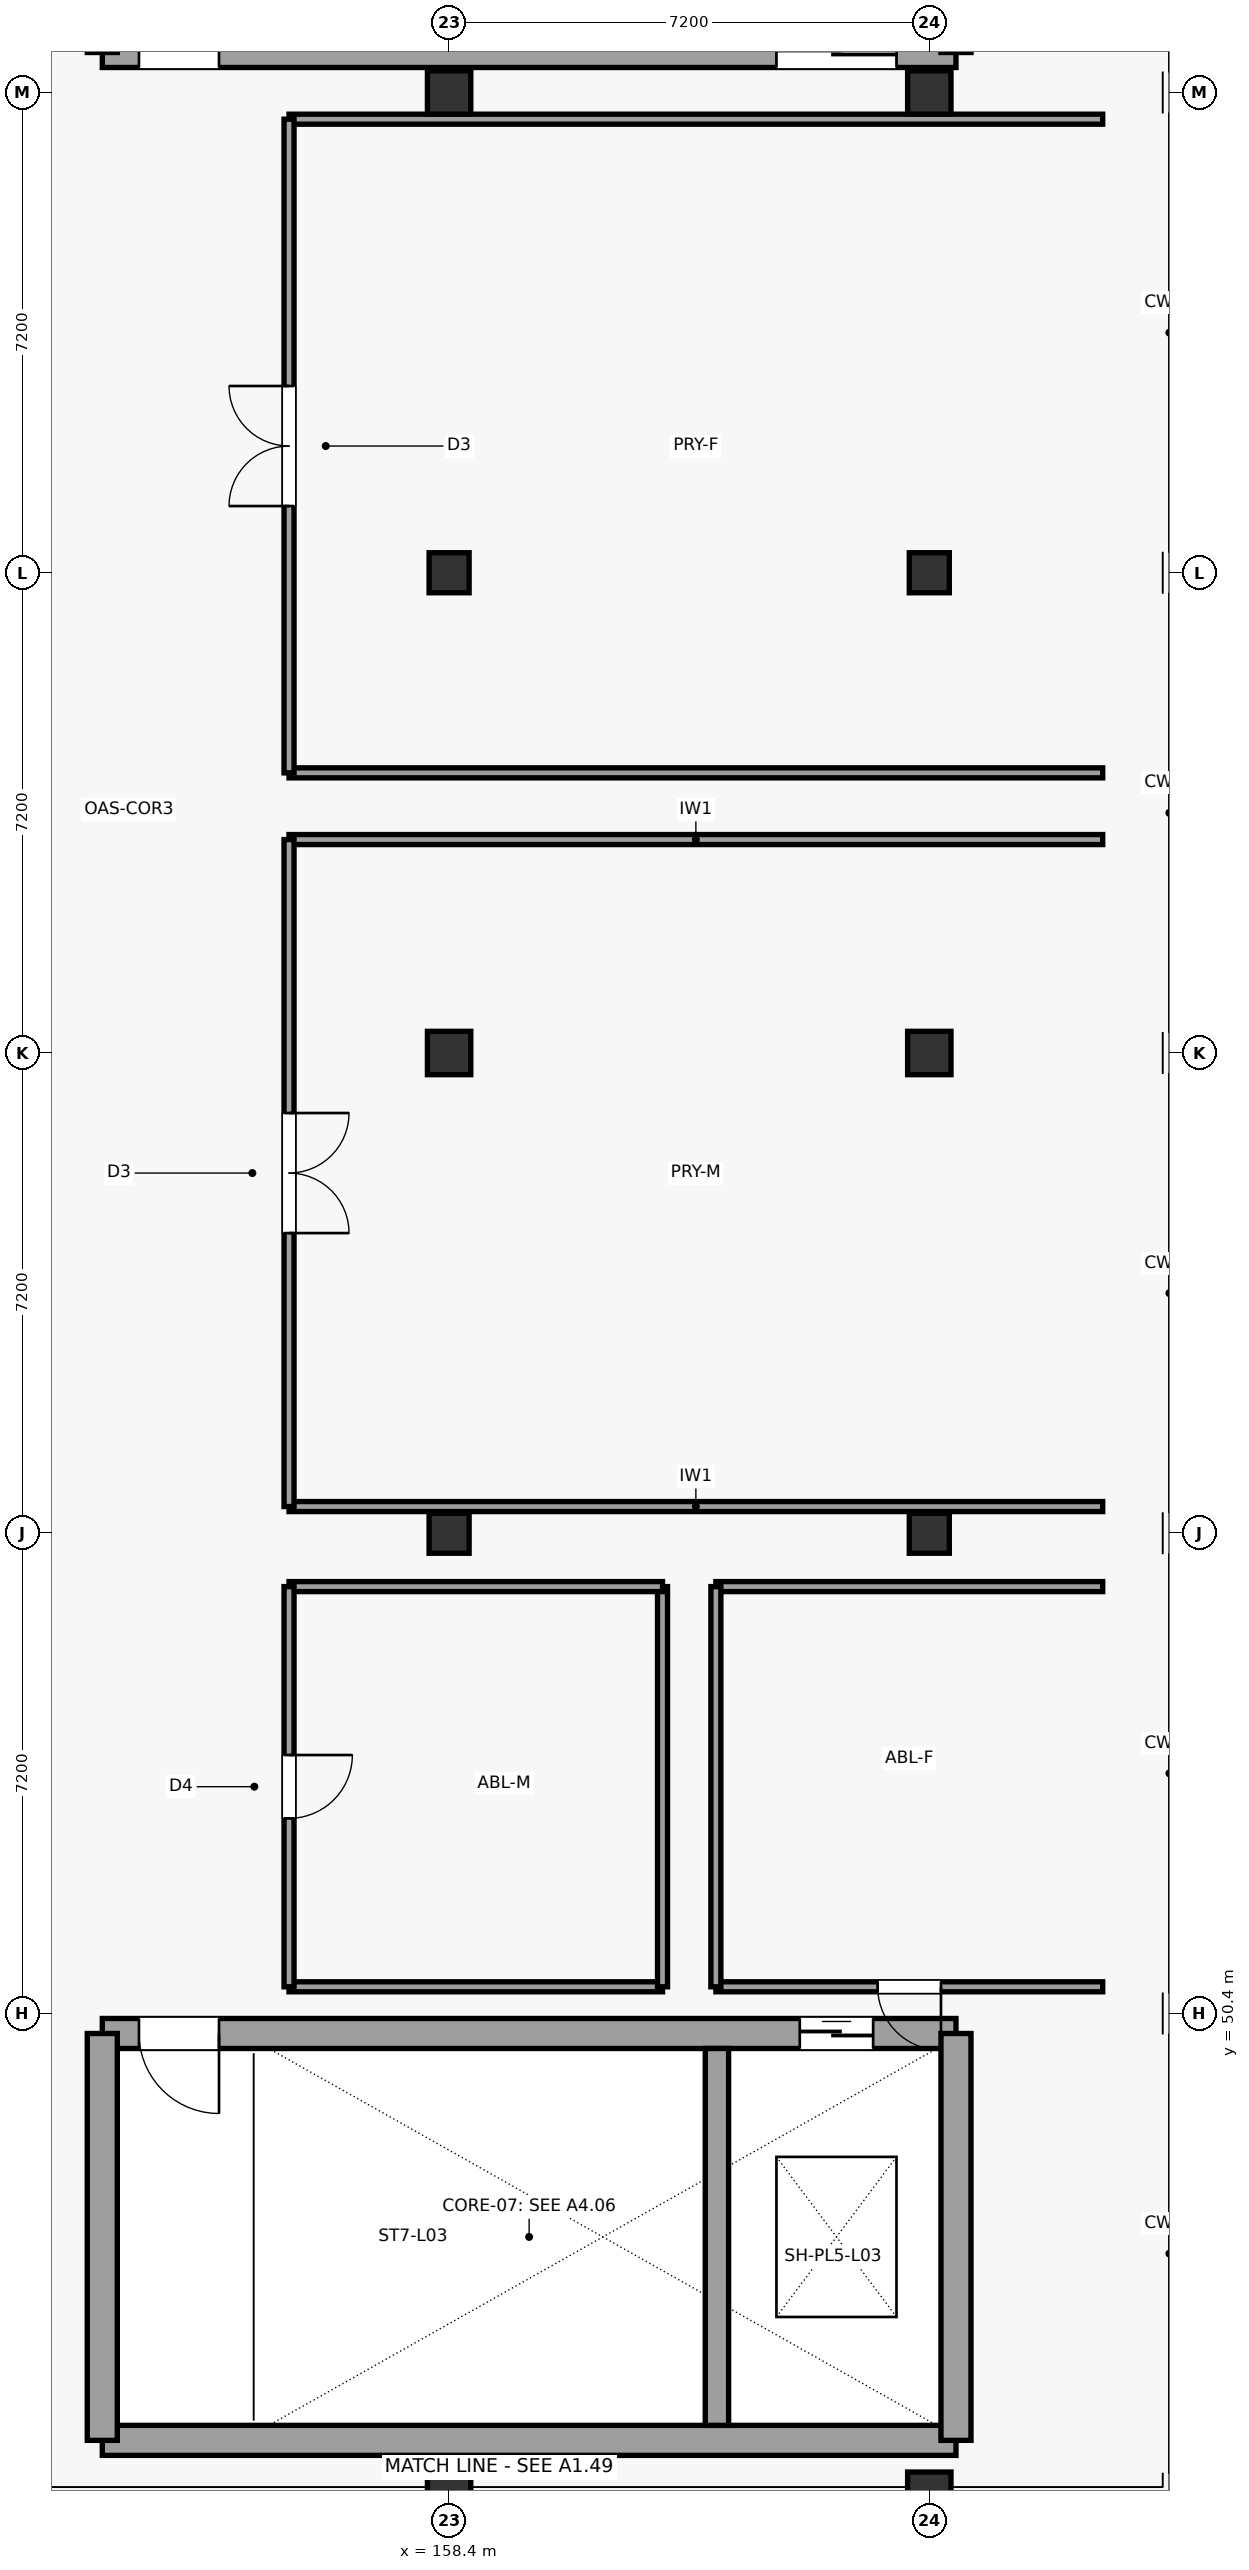
"""IFC4 building model, lengths in metres.
Left out: names, types, materials, properties, quantities, classifications, styles, units other than length and angle.
Written with IfcOpenShell. Run it as: python <this file> out.ifc"""

import sys

from ifc_helpers import new_model, si_unit, direction, frame, frame_2d, origin, origin_2d, place, context, subcontext, project, spatial, rectangle, extrude, element, fill, save


model = new_model("IFC4")
c1 = context("Model", 3, precision=1e-05, world=origin(), true_north=direction((0.0, 1.0)))
c2 = subcontext(c1, "Body", "Model", "MODEL_VIEW")
j1 = project(units=[si_unit("LENGTHUNIT", "METRE"), si_unit("PLANEANGLEUNIT", "RADIAN")], contexts=[c1])
p1 = place(None, origin())
s1 = spatial("IfcSite", under=j1, at=p1, CompositionType="ELEMENT")
p2 = place(p1, origin())
s2 = spatial("IfcBuilding", under=s1, at=p2, CompositionType="ELEMENT")
p3 = place(p2, frame((0.0, 0.0, 13.8)))
s3 = spatial("IfcBuildingStorey", under=s2, at=p3, CompositionType="ELEMENT", Elevation=13.8)
p4 = place(p3, frame((158.4, 43.2, 0.0), z_axis=(0.0, 0.0, 1.0), x_axis=(1.0, 0.0, 0.0)))
e1 = element("IfcColumn", 1, at=p4, inside=s3, PredefinedType="COLUMN", context=c2, shape_type="SweptSolid", body=[
    extrude(rectangle(XDim=0.65, YDim=0.65, at=origin_2d()), origin(), (0.0, 0.0, 1.0), 4.8),
])
p5 = place(p3, frame((158.4, 57.6, 0.0), z_axis=(0.0, 0.0, 1.0), x_axis=(1.0, 0.0, 0.0)))
e2 = element("IfcColumn", 2, at=p5, inside=s3, PredefinedType="COLUMN", context=c2, shape_type="SweptSolid", body=[
    extrude(rectangle(XDim=0.6, YDim=0.6, at=origin_2d()), origin(), (0.0, 0.0, 1.0), 4.8),
])
p6 = place(p3, frame((158.4, 64.8, 0.0), z_axis=(0.0, 0.0, 1.0), x_axis=(1.0, 0.0, 0.0)))
e3 = element("IfcColumn", 3, at=p6, inside=s3, PredefinedType="COLUMN", context=c2, shape_type="SweptSolid", body=[
    extrude(rectangle(XDim=0.65, YDim=0.65, at=origin_2d()), origin(), (0.0, 0.0, 1.0), 4.8),
])
p7 = place(p3, frame((158.4, 72.0, 0.0), z_axis=(0.0, 0.0, 1.0), x_axis=(1.0, 0.0, 0.0)))
e4 = element("IfcColumn", 4, at=p7, inside=s3, PredefinedType="COLUMN", context=c2, shape_type="SweptSolid", body=[
    extrude(rectangle(XDim=0.6, YDim=0.6, at=origin_2d()), origin(), (0.0, 0.0, 1.0), 4.8),
])
for number, where, z_axis, x_axis in (
    (5, (158.4, 79.2, 0.0), (0.0, 0.0, 1.0), (1.0, 0.0, 0.0)),
    (6, (165.6, 43.2, 0.0), (0.0, 0.0, 1.0), (1.0, 0.0, 0.0)),
):
    element("IfcColumn", number, at=place(p3, frame(where, z_axis=z_axis, x_axis=x_axis)), inside=s3, PredefinedType="COLUMN", context=c2, shape_type="SweptSolid", body=[
        extrude(rectangle(XDim=0.65, YDim=0.65, at=origin_2d()), origin(), (0.0, 0.0, 1.0), 4.8),
    ])
p8 = place(p3, frame((165.6, 57.6, 0.0), z_axis=(0.0, 0.0, 1.0), x_axis=(1.0, 0.0, 0.0)))
e7 = element("IfcColumn", 7, at=p8, inside=s3, PredefinedType="COLUMN", context=c2, shape_type="SweptSolid", body=[
    extrude(rectangle(XDim=0.6, YDim=0.6, at=origin_2d()), origin(), (0.0, 0.0, 1.0), 4.8),
])
p9 = place(p3, frame((165.6, 64.8, 0.0), z_axis=(0.0, 0.0, 1.0), x_axis=(1.0, 0.0, 0.0)))
e8 = element("IfcColumn", 8, at=p9, inside=s3, PredefinedType="COLUMN", context=c2, shape_type="SweptSolid", body=[
    extrude(rectangle(XDim=0.65, YDim=0.65, at=origin_2d()), origin(), (0.0, 0.0, 1.0), 4.8),
])
p10 = place(p3, frame((165.6, 72.0, 0.0), z_axis=(0.0, 0.0, 1.0), x_axis=(1.0, 0.0, 0.0)))
e9 = element("IfcColumn", 9, at=p10, inside=s3, PredefinedType="COLUMN", context=c2, shape_type="SweptSolid", body=[
    extrude(rectangle(XDim=0.6, YDim=0.6, at=origin_2d()), origin(), (0.0, 0.0, 1.0), 4.8),
])
p11 = place(p3, frame((165.6, 79.2, 0.0), z_axis=(0.0, 0.0, 1.0), x_axis=(1.0, 0.0, 0.0)))
e10 = element("IfcColumn", 10, at=p11, inside=s3, PredefinedType="COLUMN", context=c2, shape_type="SweptSolid", body=[
    extrude(rectangle(XDim=0.65, YDim=0.65, at=origin_2d()), origin(), (0.0, 0.0, 1.0), 4.8),
])
p12 = place(p3, frame((153.2, 44.0, 0.0), z_axis=(0.0, 0.0, 1.0), x_axis=(1.0, 0.0, 0.0)))
e11 = element("IfcWall", 11, at=p12, inside=s3, PredefinedType="SHEAR", context=c2, shape_type="SweptSolid", body=[
    extrude(rectangle(XDim=12.8, YDim=0.45, at=frame_2d((6.4, 0.0))), origin(), (0.0, 0.0, 1.0), 4.53),
])
p13 = place(p3, frame((153.2, 50.1, 0.0), z_axis=(0.0, 0.0, 1.0), x_axis=(1.0, 0.0, 0.0)))
e12 = element("IfcWall", 12, at=p13, inside=s3, PredefinedType="SHEAR", context=c2, shape_type="SweptSolid", body=[
    extrude(rectangle(XDim=12.8, YDim=0.45, at=frame_2d((6.4, 0.0))), origin(), (0.0, 0.0, 1.0), 4.53),
])
p14 = place(p13, frame((0.55, 0.0, 0.0)))
e13 = element("IfcOpeningElement", 13, at=p14, cuts=e12, PredefinedType="OPENING", context=c2, shape_type="SweptSolid", body=[
    extrude(rectangle(XDim=1.2, YDim=2.25, at=frame_2d((0.6, 1.125))), frame((0.0, 0.235, 0.0), z_axis=(0.0, -1.0, 0.0), x_axis=(1.0, 0.0, 0.0)), (0.0, 0.0, 1.0), 0.47),
])
p15 = place(p13, frame((10.458, 0.0, 0.0)))
e14 = element("IfcOpeningElement", 14, at=p15, cuts=e12, PredefinedType="OPENING", context=c2, shape_type="SweptSolid", body=[
    extrude(rectangle(XDim=1.1, YDim=2.2, at=frame_2d((0.55, 1.1))), frame((0.0, 0.235, 0.0), z_axis=(0.0, -1.0, 0.0), x_axis=(1.0, 0.0, 0.0)), (0.0, 0.0, 1.0), 0.47),
])
for number, where, z_axis, x_axis in (
    (15, (153.2, 44.0, 0.0), (0.0, 0.0, 1.0), (0.0, 1.0, 0.0)),
    (16, (166.0, 44.0, 0.0), (0.0, 0.0, 1.0), (0.0, 1.0, 0.0)),
):
    element("IfcWall", number, at=place(p3, frame(where, z_axis=z_axis, x_axis=x_axis)), inside=s3, PredefinedType="SHEAR", context=c2, shape_type="SweptSolid", body=[
        extrude(rectangle(XDim=6.1, YDim=0.45, at=frame_2d((3.05, 0.0))), origin(), (0.0, 0.0, 1.0), 4.53),
    ])
p16 = place(p3, frame((162.416, 44.225, 0.0), z_axis=(0.0, 0.0, 1.0), x_axis=(0.0, 1.0, 0.0)))
e17 = element("IfcWall", 17, at=p16, inside=s3, PredefinedType="SHEAR", context=c2, shape_type="SweptSolid", body=[
    extrude(rectangle(XDim=5.65, YDim=0.35, at=frame_2d((2.825, 0.0))), origin(), (0.0, 0.0, 1.0), 4.53),
])
p17 = place(p3, frame((153.2, 79.8, 0.0), z_axis=(0.0, 0.0, 1.0), x_axis=(1.0, 0.0, 0.0)))
e18 = element("IfcWall", 18, at=p17, inside=s3, PredefinedType="SHEAR", context=c2, shape_type="SweptSolid", body=[
    extrude(rectangle(XDim=12.8, YDim=0.45, at=frame_2d((6.4, 0.0))), origin(), (0.0, 0.0, 1.0), 4.53),
])
p18 = place(p17, frame((0.55, 0.0, 0.0)))
e19 = element("IfcOpeningElement", 19, at=p18, cuts=e18, PredefinedType="OPENING", context=c2, shape_type="SweptSolid", body=[
    extrude(rectangle(XDim=1.2, YDim=2.25, at=frame_2d((0.6, 1.125))), frame((0.0, 0.235, 0.0), z_axis=(0.0, -1.0, 0.0), x_axis=(1.0, 0.0, 0.0)), (0.0, 0.0, 1.0), 0.47),
])
p19 = place(p17, frame((10.108, 0.0, 0.0)))
e20 = element("IfcOpeningElement", 20, at=p19, cuts=e18, PredefinedType="OPENING", context=c2, shape_type="SweptSolid", body=[
    extrude(rectangle(XDim=1.8, YDim=2.4, at=frame_2d((0.9, 1.2))), frame((0.0, 0.235, 0.0), z_axis=(0.0, -1.0, 0.0), x_axis=(1.0, 0.0, 0.0)), (0.0, 0.0, 1.0), 0.47),
])
for number, where, z_axis, x_axis in (
    (21, (153.2, 79.8, 0.0), (0.0, 0.0, 1.0), (0.0, 1.0, 0.0)),
    (22, (166.0, 79.8, 0.0), (0.0, 0.0, 1.0), (0.0, 1.0, 0.0)),
):
    element("IfcWall", number, at=place(p3, frame(where, z_axis=z_axis, x_axis=x_axis)), inside=s3, PredefinedType="SHEAR", context=c2, shape_type="SweptSolid", body=[
        extrude(rectangle(XDim=6.1, YDim=0.45, at=frame_2d((3.05, 0.0))), origin(), (0.0, 0.0, 1.0), 4.53),
    ])
for number, where, z_axis, x_axis in (
    (23, (156.0, 58.0, 0.0), (0.0, 0.0, 1.0), (1.0, 0.0, 0.0)),
    (24, (168.2, 68.0, 0.0), (0.0, 0.0, 1.0), (-1.0, 0.0, 0.0)),
):
    element("IfcWall", number, at=place(p3, frame(where, z_axis=z_axis, x_axis=x_axis)), inside=s3, PredefinedType="PARTITIONING", context=c2, shape_type="SweptSolid", body=[
        extrude(rectangle(XDim=12.2, YDim=0.15, at=frame_2d((6.1, 0.0))), origin(), (0.0, 0.0, 1.0), 3.59),
    ])
p20 = place(p3, frame((156.0, 68.0, 0.0), z_axis=(0.0, 0.0, 1.0), x_axis=(0.0, -1.0, 0.0)))
e25 = element("IfcWall", 25, at=p20, inside=s3, PredefinedType="PARTITIONING", context=c2, shape_type="SweptSolid", body=[
    extrude(rectangle(XDim=10.0, YDim=0.15, at=frame_2d((5.0, 0.0))), origin(), (0.0, 0.0, 1.0), 3.59),
])
p21 = place(p20, frame((4.1, 0.0, 0.0)))
e26 = element("IfcOpeningElement", 26, at=p21, cuts=e25, PredefinedType="OPENING", context=c2, shape_type="SweptSolid", body=[
    extrude(rectangle(XDim=1.8, YDim=2.3, at=frame_2d((0.9, 1.15))), frame((0.0, 0.085, 0.0), z_axis=(0.0, -1.0, 0.0), x_axis=(1.0, 0.0, 0.0)), (0.0, 0.0, 1.0), 0.17),
])
for number, where, z_axis, x_axis in (
    (27, (156.0, 69.0, 0.0), (0.0, 0.0, 1.0), (1.0, 0.0, 0.0)),
    (28, (168.2, 78.8, 0.0), (0.0, 0.0, 1.0), (-1.0, 0.0, 0.0)),
):
    element("IfcWall", number, at=place(p3, frame(where, z_axis=z_axis, x_axis=x_axis)), inside=s3, PredefinedType="PARTITIONING", context=c2, shape_type="SweptSolid", body=[
        extrude(rectangle(XDim=12.2, YDim=0.15, at=frame_2d((6.1, 0.0))), origin(), (0.0, 0.0, 1.0), 3.59),
    ])
p22 = place(p3, frame((156.0, 78.8, 0.0), z_axis=(0.0, 0.0, 1.0), x_axis=(0.0, -1.0, 0.0)))
e29 = element("IfcWall", 29, at=p22, inside=s3, PredefinedType="PARTITIONING", context=c2, shape_type="SweptSolid", body=[
    extrude(rectangle(XDim=9.8, YDim=0.15, at=frame_2d((4.9, 0.0))), origin(), (0.0, 0.0, 1.0), 3.59),
])
p23 = place(p22, frame((4.0, 0.0, 0.0)))
e30 = element("IfcOpeningElement", 30, at=p23, cuts=e29, PredefinedType="OPENING", context=c2, shape_type="SweptSolid", body=[
    extrude(rectangle(XDim=1.8, YDim=2.3, at=frame_2d((0.9, 1.15))), frame((0.0, 0.085, 0.0), z_axis=(0.0, -1.0, 0.0), x_axis=(1.0, 0.0, 0.0)), (0.0, 0.0, 1.0), 0.17),
])
p24 = place(p3, frame((156.0, 50.8, 0.0), z_axis=(0.0, 0.0, 1.0), x_axis=(1.0, 0.0, 0.0)))
e31 = element("IfcWall", 31, at=p24, inside=s3, PredefinedType="PARTITIONING", context=c2, shape_type="SweptSolid", body=[
    extrude(rectangle(XDim=5.6, YDim=0.15, at=frame_2d((2.8, 0.0))), origin(), (0.0, 0.0, 1.0), 3.59),
])
p25 = place(p3, frame((161.6, 50.8, 0.0), z_axis=(0.0, 0.0, 1.0), x_axis=(0.0, 1.0, 0.0)))
e32 = element("IfcWall", 32, at=p25, inside=s3, PredefinedType="PARTITIONING", context=c2, shape_type="SweptSolid", body=[
    extrude(rectangle(XDim=6.0, YDim=0.15, at=frame_2d((3.0, 0.0))), origin(), (0.0, 0.0, 1.0), 3.59),
])
p26 = place(p3, frame((161.6, 56.8, 0.0), z_axis=(0.0, 0.0, 1.0), x_axis=(-1.0, 0.0, 0.0)))
e33 = element("IfcWall", 33, at=p26, inside=s3, PredefinedType="PARTITIONING", context=c2, shape_type="SweptSolid", body=[
    extrude(rectangle(XDim=5.6, YDim=0.15, at=frame_2d((2.8, 0.0))), origin(), (0.0, 0.0, 1.0), 3.59),
])
p27 = place(p3, frame((156.0, 56.8, 0.0), z_axis=(0.0, 0.0, 1.0), x_axis=(0.0, -1.0, 0.0)))
e34 = element("IfcWall", 34, at=p27, inside=s3, PredefinedType="PARTITIONING", context=c2, shape_type="SweptSolid", body=[
    extrude(rectangle(XDim=6.0, YDim=0.15, at=frame_2d((3.0, 0.0))), origin(), (0.0, 0.0, 1.0), 3.59),
])
p28 = place(p27, frame((2.525, 0.0, 0.0)))
e35 = element("IfcOpeningElement", 35, at=p28, cuts=e34, PredefinedType="OPENING", context=c2, shape_type="SweptSolid", body=[
    extrude(rectangle(XDim=0.95, YDim=2.15, at=frame_2d((0.475, 1.075))), frame((0.0, 0.085, 0.0), z_axis=(0.0, -1.0, 0.0), x_axis=(1.0, 0.0, 0.0)), (0.0, 0.0, 1.0), 0.17),
])
p29 = place(p3, frame((162.4, 50.8, 0.0), z_axis=(0.0, 0.0, 1.0), x_axis=(1.0, 0.0, 0.0)))
e36 = element("IfcWall", 36, at=p29, inside=s3, PredefinedType="PARTITIONING", context=c2, shape_type="SweptSolid", body=[
    extrude(rectangle(XDim=5.8, YDim=0.15, at=frame_2d((2.9, 0.0))), origin(), (0.0, 0.0, 1.0), 3.59),
])
p30 = place(p29, frame((2.425, 0.0, 0.0)))
e37 = element("IfcOpeningElement", 37, at=p30, cuts=e36, PredefinedType="OPENING", context=c2, shape_type="SweptSolid", body=[
    extrude(rectangle(XDim=0.95, YDim=2.15, at=frame_2d((0.475, 1.075))), frame((0.0, 0.085, 0.0), z_axis=(0.0, -1.0, 0.0), x_axis=(1.0, 0.0, 0.0)), (0.0, 0.0, 1.0), 0.17),
])
p31 = place(p3, frame((168.2, 56.8, 0.0), z_axis=(0.0, 0.0, 1.0), x_axis=(-1.0, 0.0, 0.0)))
e38 = element("IfcWall", 38, at=p31, inside=s3, PredefinedType="PARTITIONING", context=c2, shape_type="SweptSolid", body=[
    extrude(rectangle(XDim=5.8, YDim=0.15, at=frame_2d((2.9, 0.0))), origin(), (0.0, 0.0, 1.0), 3.59),
])
p32 = place(p3, frame((162.4, 56.8, 0.0), z_axis=(0.0, 0.0, 1.0), x_axis=(0.0, -1.0, 0.0)))
e39 = element("IfcWall", 39, at=p32, inside=s3, PredefinedType="PARTITIONING", context=c2, shape_type="SweptSolid", body=[
    extrude(rectangle(XDim=6.0, YDim=0.15, at=frame_2d((3.0, 0.0))), origin(), (0.0, 0.0, 1.0), 3.59),
])
p33 = place(p14, frame((1.2, 0.0, 0.0), z_axis=(0.0, 0.0, 1.0), x_axis=(-1.0, 0.0, 0.0)))
e40 = element("IfcDoor", 40, at=p33, inside=s3, OperationType="SINGLE_SWING_RIGHT", PredefinedType="DOOR", context=c2, shape_type="SweptSolid", body=[
    extrude(rectangle(XDim=1.2, YDim=2.25, at=frame_2d((0.6, 1.125))), frame((0.0, 0.025, 0.0), z_axis=(0.0, -1.0, 0.0), x_axis=(1.0, 0.0, 0.0)), (0.0, 0.0, 1.0), 0.05),
])
fill(e13, e40)
p34 = place(p15, origin())
e41 = element("IfcDoor", 41, at=p34, inside=s3, OperationType="SLIDING_TO_LEFT", PredefinedType="DOOR", context=c2, shape_type="SweptSolid", body=[
    extrude(rectangle(XDim=1.1, YDim=2.2, at=frame_2d((0.55, 1.1))), frame((0.0, 0.025, 0.0), z_axis=(0.0, -1.0, 0.0), x_axis=(1.0, 0.0, 0.0)), (0.0, 0.0, 1.0), 0.05),
])
fill(e14, e41)
p35 = place(p18, origin())
e42 = element("IfcDoor", 42, at=p35, inside=s3, OperationType="SINGLE_SWING_LEFT", PredefinedType="DOOR", context=c2, shape_type="SweptSolid", body=[
    extrude(rectangle(XDim=1.2, YDim=2.25, at=frame_2d((0.6, 1.125))), frame((0.0, 0.025, 0.0), z_axis=(0.0, -1.0, 0.0), x_axis=(1.0, 0.0, 0.0)), (0.0, 0.0, 1.0), 0.05),
])
fill(e19, e42)
p36 = place(p19, origin())
e43 = element("IfcDoor", 43, at=p36, inside=s3, OperationType="SLIDING_TO_LEFT", PredefinedType="DOOR", context=c2, shape_type="SweptSolid", body=[
    extrude(rectangle(XDim=1.8, YDim=2.4, at=frame_2d((0.9, 1.2))), frame((0.0, 0.025, 0.0), z_axis=(0.0, -1.0, 0.0), x_axis=(1.0, 0.0, 0.0)), (0.0, 0.0, 1.0), 0.05),
])
fill(e20, e43)
p37 = place(p21, origin())
e44 = element("IfcDoor", 44, at=p37, inside=s3, OperationType="DOUBLE_DOOR_SINGLE_SWING", PredefinedType="DOOR", context=c2, shape_type="SweptSolid", body=[
    extrude(rectangle(XDim=1.8, YDim=2.3, at=frame_2d((0.9, 1.15))), frame((0.0, 0.025, 0.0), z_axis=(0.0, -1.0, 0.0), x_axis=(1.0, 0.0, 0.0)), (0.0, 0.0, 1.0), 0.05),
])
fill(e26, e44)
p38 = place(p23, frame((1.8, 0.0, 0.0), z_axis=(0.0, 0.0, 1.0), x_axis=(-1.0, 0.0, 0.0)))
e45 = element("IfcDoor", 45, at=p38, inside=s3, OperationType="DOUBLE_DOOR_SINGLE_SWING", PredefinedType="DOOR", context=c2, shape_type="SweptSolid", body=[
    extrude(rectangle(XDim=1.8, YDim=2.3, at=frame_2d((0.9, 1.15))), frame((0.0, 0.025, 0.0), z_axis=(0.0, -1.0, 0.0), x_axis=(1.0, 0.0, 0.0)), (0.0, 0.0, 1.0), 0.05),
])
fill(e30, e45)
p39 = place(p28, origin())
e46 = element("IfcDoor", 46, at=p39, inside=s3, OperationType="SINGLE_SWING_LEFT", PredefinedType="DOOR", context=c2, shape_type="SweptSolid", body=[
    extrude(rectangle(XDim=0.95, YDim=2.15, at=frame_2d((0.475, 1.075))), frame((0.0, 0.025, 0.0), z_axis=(0.0, -1.0, 0.0), x_axis=(1.0, 0.0, 0.0)), (0.0, 0.0, 1.0), 0.05),
])
fill(e35, e46)
p40 = place(p30, frame((0.95, 0.0, 0.0), z_axis=(0.0, 0.0, 1.0), x_axis=(-1.0, 0.0, 0.0)))
e47 = element("IfcDoor", 47, at=p40, inside=s3, OperationType="SINGLE_SWING_RIGHT", PredefinedType="DOOR", context=c2, shape_type="SweptSolid", body=[
    extrude(rectangle(XDim=0.95, YDim=2.15, at=frame_2d((0.475, 1.075))), frame((0.0, 0.025, 0.0), z_axis=(0.0, -1.0, 0.0), x_axis=(1.0, 0.0, 0.0)), (0.0, 0.0, 1.0), 0.05),
])
fill(e37, e47)
save(model, sys.argv[1])
